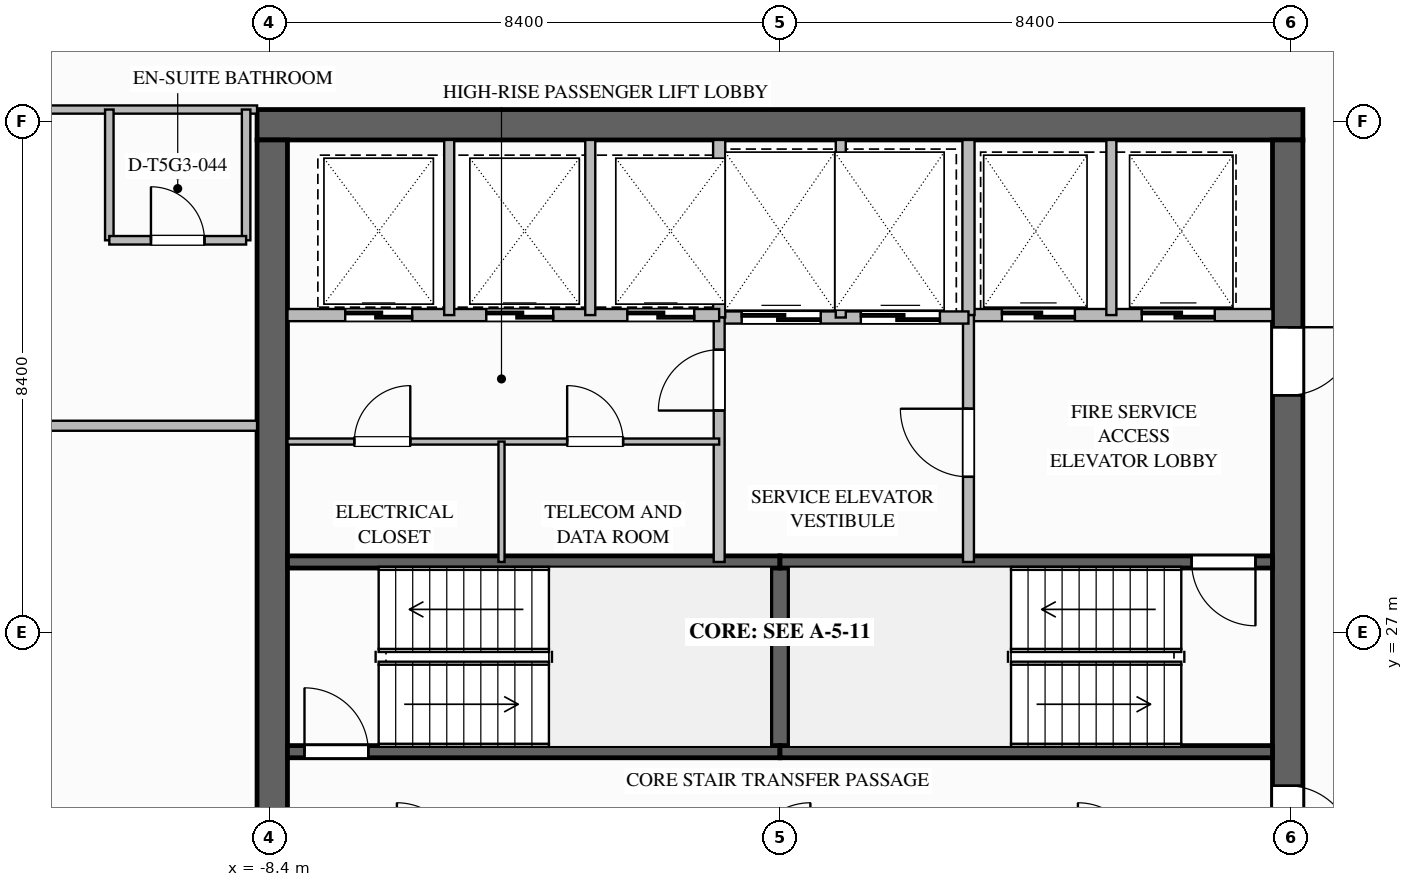
"""IFC4 building model, lengths in metres.
Left out: names, types, materials, properties, quantities, classifications, styles, units other than length and angle.
Written with IfcOpenShell. Run it as: python <this file> out.ifc"""

import sys

from ifc_helpers import new_model, si_unit, direction, frame, frame_2d, origin, place, context, subcontext, project, spatial, rectangle, extrude, element, fill, save


model = new_model("IFC4")
c1 = context("Model", 3, precision=1e-05, world=origin(), true_north=direction((0.0, 1.0)))
c2 = subcontext(c1, "Body", "Model", "MODEL_VIEW")
j1 = project(units=[si_unit("LENGTHUNIT", "METRE"), si_unit("PLANEANGLEUNIT", "RADIAN")], contexts=[c1])
p1 = place(None, origin())
s1 = spatial("IfcSite", under=j1, at=p1, CompositionType="ELEMENT")
p2 = place(p1, origin())
s2 = spatial("IfcBuilding", under=s1, at=p2, CompositionType="ELEMENT")
p3 = place(p2, frame((0.0, 0.0, 286.9)))
s3 = spatial("IfcBuildingStorey", under=s2, at=p3, CompositionType="ELEMENT", Elevation=286.9)
p4 = place(p3, frame((-8.6, 35.35, 0.0), z_axis=(0.0, 0.0, 1.0), x_axis=(1.0, 0.0, 0.0)))
e1 = element("IfcWall", 1, at=p4, inside=s3, PredefinedType="SHEAR", context=c2, shape_type="SweptSolid", body=[
    extrude(rectangle(XDim=17.2, YDim=0.5, at=frame_2d((8.6, 0.0))), origin(), (0.0, 0.0, 1.0), 3.65),
])
p5 = place(p3, frame((8.35, 35.1, 0.0), z_axis=(0.0, 0.0, 1.0), x_axis=(0.0, -1.0, 0.0)))
e2 = element("IfcWall", 2, at=p5, inside=s3, PredefinedType="SHEAR", context=c2, shape_type="SweptSolid", body=[
    extrude(rectangle(XDim=16.2, YDim=0.5, at=frame_2d((8.1, 0.0))), origin(), (0.0, 0.0, 1.0), 3.65),
])
p6 = place(p5, frame((3.08, 0.0, 0.0)))
e3 = element("IfcOpeningElement", 3, at=p6, cuts=e2, PredefinedType="OPENING", context=c2, shape_type="SweptSolid", body=[
    extrude(rectangle(XDim=1.12, YDim=2.1, at=frame_2d((0.56, 1.05))), frame((0.0, 0.26, 0.0), z_axis=(0.0, -1.0, 0.0), x_axis=(1.0, 0.0, 0.0)), (0.0, 0.0, 1.0), 0.52),
])
p7 = place(p5, frame((10.62, 0.0, 0.0)))
e4 = element("IfcOpeningElement", 4, at=p7, cuts=e2, PredefinedType="OPENING", context=c2, shape_type="SweptSolid", body=[
    extrude(rectangle(XDim=1.08, YDim=2.04, at=frame_2d((0.54, 1.02))), frame((0.0, 0.26, 0.0), z_axis=(0.0, -1.0, 0.0), x_axis=(1.0, 0.0, 0.0)), (0.0, 0.0, 1.0), 0.52),
])
p8 = place(p3, frame((-8.35, 18.9, 0.0), z_axis=(0.0, 0.0, 1.0), x_axis=(0.0, 1.0, 0.0)))
e5 = element("IfcWall", 5, at=p8, inside=s3, PredefinedType="SHEAR", context=c2, shape_type="SweptSolid", body=[
    extrude(rectangle(XDim=16.2, YDim=0.5, at=frame_2d((8.1, 0.0))), origin(), (0.0, 0.0, 1.0), 3.65),
])
p9 = place(p3, frame((0.0, 25.04, 0.0), z_axis=(0.0, 0.0, 1.0), x_axis=(0.0, 1.0, 0.0)))
e6 = element("IfcWall", 6, at=p9, inside=s3, PredefinedType="SOLIDWALL", context=c2, shape_type="SweptSolid", body=[
    extrude(rectangle(XDim=3.12, YDim=0.3, at=frame_2d((1.56, 0.0))), origin(), (0.0, 0.0, 1.0), 3.39),
])
p10 = place(p3, frame((-8.1, 25.04, 0.0), z_axis=(0.0, 0.0, 1.0), x_axis=(1.0, 0.0, 0.0)))
e7 = element("IfcWall", 7, at=p10, inside=s3, PredefinedType="SOLIDWALL", context=c2, shape_type="SweptSolid", body=[
    extrude(rectangle(XDim=8.1, YDim=0.2, at=frame_2d((4.05, 0.0))), origin(), (0.0, 0.0, 1.0), 3.39),
])
p11 = place(p10, frame((0.28, 0.0, 0.0)))
e8 = element("IfcOpeningElement", 8, at=p11, cuts=e7, PredefinedType="OPENING", context=c2, shape_type="SweptSolid", body=[
    extrude(rectangle(XDim=1.05, YDim=2.1, at=frame_2d((0.525, 1.05))), frame((0.0, 0.11, 0.0), z_axis=(0.0, -1.0, 0.0), x_axis=(1.0, 0.0, 0.0)), (0.0, 0.0, 1.0), 0.22),
])
for number, where, z_axis, x_axis in (
    (9, (-8.1, 28.16, 0.0), (0.0, 0.0, 1.0), (1.0, 0.0, 0.0)),
    (10, (0.0, 25.04, 0.0), (0.0, 0.0, 1.0), (1.0, 0.0, 0.0)),
):
    element("IfcWall", number, at=place(p3, frame(where, z_axis=z_axis, x_axis=x_axis)), inside=s3, PredefinedType="SOLIDWALL", context=c2, shape_type="SweptSolid", body=[
        extrude(rectangle(XDim=8.1, YDim=0.2, at=frame_2d((4.05, 0.0))), origin(), (0.0, 0.0, 1.0), 3.39),
    ])
p12 = place(p3, frame((8.1, 28.16, 0.0), z_axis=(0.0, 0.0, 1.0), x_axis=(-1.0, 0.0, 0.0)))
e11 = element("IfcWall", 11, at=p12, inside=s3, PredefinedType="SOLIDWALL", context=c2, shape_type="SweptSolid", body=[
    extrude(rectangle(XDim=8.1, YDim=0.2, at=frame_2d((4.05, 0.0))), origin(), (0.0, 0.0, 1.0), 3.39),
])
p13 = place(p12, frame((0.28, 0.0, 0.0)))
e12 = element("IfcOpeningElement", 12, at=p13, cuts=e11, PredefinedType="OPENING", context=c2, shape_type="SweptSolid", body=[
    extrude(rectangle(XDim=1.05, YDim=2.1, at=frame_2d((0.525, 1.05))), frame((0.0, 0.11, 0.0), z_axis=(0.0, -1.0, 0.0), x_axis=(1.0, 0.0, 0.0)), (0.0, 0.0, 1.0), 0.22),
])
p14 = place(p3, frame((3.1, 32.22, 0.0), z_axis=(0.0, 0.0, 1.0), x_axis=(1.0, 0.0, 0.0)))
e13 = element("IfcWall", 13, at=p14, inside=s3, PredefinedType="SOLIDWALL", context=c2, shape_type="SweptSolid", body=[
    extrude(rectangle(XDim=5.0, YDim=0.2, at=frame_2d((2.5, 0.0))), origin(), (0.0, 0.0, 1.0), 3.39),
])
p15 = place(p14, frame((0.55, 0.0, 0.0)))
e14 = element("IfcOpeningElement", 14, at=p15, cuts=e13, PredefinedType="OPENING", context=c2, shape_type="SweptSolid", body=[
    extrude(rectangle(XDim=1.2, YDim=2.2, at=frame_2d((0.6, 1.1))), frame((0.0, 0.11, 0.0), z_axis=(0.0, -1.0, 0.0), x_axis=(1.0, 0.0, 0.0)), (0.0, 0.0, 1.0), 0.22),
])
p16 = place(p14, frame((2.85, 0.0, 0.0)))
e15 = element("IfcOpeningElement", 15, at=p16, cuts=e13, PredefinedType="OPENING", context=c2, shape_type="SweptSolid", body=[
    extrude(rectangle(XDim=1.2, YDim=2.2, at=frame_2d((0.6, 1.1))), frame((0.0, 0.11, 0.0), z_axis=(0.0, -1.0, 0.0), x_axis=(1.0, 0.0, 0.0)), (0.0, 0.0, 1.0), 0.22),
])
p17 = place(p3, frame((3.1, 32.22, 0.0), z_axis=(0.0, 0.0, 1.0), x_axis=(0.0, 1.0, 0.0)))
e16 = element("IfcWall", 16, at=p17, inside=s3, PredefinedType="SOLIDWALL", context=c2, shape_type="SweptSolid", body=[
    extrude(rectangle(XDim=2.88, YDim=0.2, at=frame_2d((1.44, 0.0))), origin(), (0.0, 0.0, 1.0), 3.39),
])
p18 = place(p3, frame((5.45, 32.22, 0.0), z_axis=(0.0, 0.0, 1.0), x_axis=(0.0, 1.0, 0.0)))
e17 = element("IfcWall", 17, at=p18, inside=s3, PredefinedType="PARTITIONING", context=c2, shape_type="SweptSolid", body=[
    extrude(rectangle(XDim=2.88, YDim=0.165, at=frame_2d((1.44, 0.0))), origin(), (0.0, 0.0, 1.0), 3.39),
])
p19 = place(p3, frame((3.1, 28.16, 0.0), z_axis=(0.0, 0.0, 1.0), x_axis=(0.0, 1.0, 0.0)))
e18 = element("IfcWall", 18, at=p19, inside=s3, PredefinedType="SOLIDWALL", context=c2, shape_type="SweptSolid", body=[
    extrude(rectangle(XDim=4.06, YDim=0.18, at=frame_2d((2.03, 0.0))), origin(), (0.0, 0.0, 1.0), 3.39),
])
p20 = place(p19, frame((1.4, 0.0, 0.0)))
e19 = element("IfcOpeningElement", 19, at=p20, cuts=e18, PredefinedType="OPENING", context=c2, shape_type="SweptSolid", body=[
    extrude(rectangle(XDim=1.12, YDim=2.1, at=frame_2d((0.56, 1.05))), frame((0.0, 0.1, 0.0), z_axis=(0.0, -1.0, 0.0), x_axis=(1.0, 0.0, 0.0)), (0.0, 0.0, 1.0), 0.2),
])
p21 = place(p3, frame((-1.0, 32.18, 0.0), z_axis=(0.0, 0.0, 1.0), x_axis=(1.0, 0.0, 0.0)))
e20 = element("IfcWall", 20, at=p21, inside=s3, PredefinedType="SOLIDWALL", context=c2, shape_type="SweptSolid", body=[
    extrude(rectangle(XDim=4.1, YDim=0.2, at=frame_2d((2.05, 0.0))), origin(), (0.0, 0.0, 1.0), 3.39),
])
p22 = place(p21, frame((0.37, 0.0, 0.0)))
e21 = element("IfcOpeningElement", 21, at=p22, cuts=e20, PredefinedType="OPENING", context=c2, shape_type="SweptSolid", body=[
    extrude(rectangle(XDim=1.3, YDim=2.2, at=frame_2d((0.65, 1.1))), frame((0.0, 0.11, 0.0), z_axis=(0.0, -1.0, 0.0), x_axis=(1.0, 0.0, 0.0)), (0.0, 0.0, 1.0), 0.22),
])
p23 = place(p21, frame((2.33, 0.0, 0.0)))
e22 = element("IfcOpeningElement", 22, at=p23, cuts=e20, PredefinedType="OPENING", context=c2, shape_type="SweptSolid", body=[
    extrude(rectangle(XDim=1.3, YDim=2.2, at=frame_2d((0.65, 1.1))), frame((0.0, 0.11, 0.0), z_axis=(0.0, -1.0, 0.0), x_axis=(1.0, 0.0, 0.0)), (0.0, 0.0, 1.0), 0.22),
])
p24 = place(p3, frame((-1.0, 32.18, 0.0), z_axis=(0.0, 0.0, 1.0), x_axis=(0.0, 1.0, 0.0)))
e23 = element("IfcWall", 23, at=p24, inside=s3, PredefinedType="SOLIDWALL", context=c2, shape_type="SweptSolid", body=[
    extrude(rectangle(XDim=2.92, YDim=0.2, at=frame_2d((1.46, 0.0))), origin(), (0.0, 0.0, 1.0), 3.39),
])
p25 = place(p3, frame((1.0, 32.18, 0.0), z_axis=(0.0, 0.0, 1.0), x_axis=(0.0, 1.0, 0.0)))
e24 = element("IfcWall", 24, at=p25, inside=s3, PredefinedType="PARTITIONING", context=c2, shape_type="SweptSolid", body=[
    extrude(rectangle(XDim=2.92, YDim=0.165, at=frame_2d((1.46, 0.0))), origin(), (0.0, 0.0, 1.0), 3.39),
])
p26 = place(p3, frame((-1.0, 28.16, 0.0), z_axis=(0.0, 0.0, 1.0), x_axis=(0.0, 1.0, 0.0)))
e25 = element("IfcWall", 25, at=p26, inside=s3, PredefinedType="SOLIDWALL", context=c2, shape_type="SweptSolid", body=[
    extrude(rectangle(XDim=4.02, YDim=0.18, at=frame_2d((2.01, 0.0))), origin(), (0.0, 0.0, 1.0), 3.39),
])
p27 = place(p26, frame((2.49, 0.0, 0.0)))
e26 = element("IfcOpeningElement", 26, at=p27, cuts=e25, PredefinedType="OPENING", context=c2, shape_type="SweptSolid", body=[
    extrude(rectangle(XDim=1.0, YDim=2.1, at=frame_2d((0.5, 1.05))), frame((0.0, 0.1, 0.0), z_axis=(0.0, -1.0, 0.0), x_axis=(1.0, 0.0, 0.0)), (0.0, 0.0, 1.0), 0.2),
])
p28 = place(p3, frame((-8.1, 32.22, 0.0), z_axis=(0.0, 0.0, 1.0), x_axis=(1.0, 0.0, 0.0)))
e27 = element("IfcWall", 27, at=p28, inside=s3, PredefinedType="SOLIDWALL", context=c2, shape_type="SweptSolid", body=[
    extrude(rectangle(XDim=7.1, YDim=0.2, at=frame_2d((3.55, 0.0))), origin(), (0.0, 0.0, 1.0), 3.39),
])
p29 = place(p28, frame((0.95, 0.0, 0.0)))
e28 = element("IfcOpeningElement", 28, at=p29, cuts=e27, PredefinedType="OPENING", context=c2, shape_type="SweptSolid", body=[
    extrude(rectangle(XDim=1.1, YDim=2.2, at=frame_2d((0.55, 1.1))), frame((0.0, 0.11, 0.0), z_axis=(0.0, -1.0, 0.0), x_axis=(1.0, 0.0, 0.0)), (0.0, 0.0, 1.0), 0.22),
])
p30 = place(p28, frame((3.27, 0.0, 0.0)))
e29 = element("IfcOpeningElement", 29, at=p30, cuts=e27, PredefinedType="OPENING", context=c2, shape_type="SweptSolid", body=[
    extrude(rectangle(XDim=1.1, YDim=2.2, at=frame_2d((0.55, 1.1))), frame((0.0, 0.11, 0.0), z_axis=(0.0, -1.0, 0.0), x_axis=(1.0, 0.0, 0.0)), (0.0, 0.0, 1.0), 0.22),
])
p31 = place(p28, frame((5.59, 0.0, 0.0)))
e30 = element("IfcOpeningElement", 30, at=p31, cuts=e27, PredefinedType="OPENING", context=c2, shape_type="SweptSolid", body=[
    extrude(rectangle(XDim=1.1, YDim=2.2, at=frame_2d((0.55, 1.1))), frame((0.0, 0.11, 0.0), z_axis=(0.0, -1.0, 0.0), x_axis=(1.0, 0.0, 0.0)), (0.0, 0.0, 1.0), 0.22),
])
for number, where, z_axis, x_axis in (
    (31, (-5.44, 32.22, 0.0), (0.0, 0.0, 1.0), (0.0, 1.0, 0.0)),
    (32, (-3.12, 32.22, 0.0), (0.0, 0.0, 1.0), (0.0, 1.0, 0.0)),
):
    element("IfcWall", number, at=place(p3, frame(where, z_axis=z_axis, x_axis=x_axis)), inside=s3, PredefinedType="PARTITIONING", context=c2, shape_type="SweptSolid", body=[
        extrude(rectangle(XDim=2.88, YDim=0.165, at=frame_2d((1.44, 0.0))), origin(), (0.0, 0.0, 1.0), 3.39),
    ])
p32 = place(p3, frame((-8.1, 30.14, 0.0), z_axis=(0.0, 0.0, 1.0), x_axis=(1.0, 0.0, 0.0)))
e33 = element("IfcWall", 33, at=p32, inside=s3, PredefinedType="PARTITIONING", context=c2, shape_type="SweptSolid", body=[
    extrude(rectangle(XDim=7.1, YDim=0.1, at=frame_2d((3.55, 0.0))), origin(), (0.0, 0.0, 1.0), 3.39),
])
p33 = place(p32, frame((1.1, 0.0, 0.0)))
e34 = element("IfcOpeningElement", 34, at=p33, cuts=e33, PredefinedType="OPENING", context=c2, shape_type="SweptSolid", body=[
    extrude(rectangle(XDim=0.92, YDim=2.1, at=frame_2d((0.46, 1.05))), frame((0.0, 0.06, 0.0), z_axis=(0.0, -1.0, 0.0), x_axis=(1.0, 0.0, 0.0)), (0.0, 0.0, 1.0), 0.12),
])
p34 = place(p32, frame((4.6, 0.0, 0.0)))
e35 = element("IfcOpeningElement", 35, at=p34, cuts=e33, PredefinedType="OPENING", context=c2, shape_type="SweptSolid", body=[
    extrude(rectangle(XDim=0.92, YDim=2.1, at=frame_2d((0.46, 1.05))), frame((0.0, 0.06, 0.0), z_axis=(0.0, -1.0, 0.0), x_axis=(1.0, 0.0, 0.0)), (0.0, 0.0, 1.0), 0.12),
])
p35 = place(p3, frame((-4.58, 28.16, 0.0), z_axis=(0.0, 0.0, 1.0), x_axis=(0.0, 1.0, 0.0)))
e36 = element("IfcWall", 36, at=p35, inside=s3, PredefinedType="PARTITIONING", context=c2, shape_type="SweptSolid", body=[
    extrude(rectangle(XDim=1.98, YDim=0.1, at=frame_2d((0.99, 0.0))), origin(), (0.0, 0.0, 1.0), 3.39),
])
p36 = place(p3, frame((-16.2, 35.6, 0.0), z_axis=(0.0, 0.0, 1.0), x_axis=(1.0, 0.0, 0.0)))
e37 = element("IfcWall", 37, at=p36, inside=s3, PredefinedType="PARTITIONING", context=c2, shape_type="SweptSolid", body=[
    extrude(rectangle(XDim=7.6, YDim=0.135, at=frame_2d((3.8, 0.0))), origin(), (0.0, 0.0, 1.0), 2.768),
])
p37 = place(p36, frame((2.155, 0.0, 0.0)))
e38 = element("IfcOpeningElement", 38, at=p37, cuts=e37, PredefinedType="OPENING", context=c2, shape_type="SweptSolid", body=[
    extrude(rectangle(XDim=1.26, YDim=2.2, at=frame_2d((0.63, 1.1))), frame((0.0, 0.077, 0.0), z_axis=(0.0, -1.0, 0.0), x_axis=(1.0, 0.0, 0.0)), (0.0, 0.0, 1.0), 0.155),
])
p38 = place(p3, frame((-21.4, 30.4, 0.0), z_axis=(0.0, 0.0, 1.0), x_axis=(1.0, 0.0, 0.0)))
e39 = element("IfcWall", 39, at=p38, inside=s3, PredefinedType="PARTITIONING", context=c2, shape_type="SweptSolid", body=[
    extrude(rectangle(XDim=12.8, YDim=0.165, at=frame_2d((6.4, 0.0))), origin(), (0.0, 0.0, 1.0), 3.39),
])
for number, where, z_axis, x_axis in (
    (40, (-11.03, 35.6, 0.0), (0.0, 0.0, 1.0), (0.0, -1.0, 0.0)),
    (41, (-8.78, 35.6, 0.0), (0.0, 0.0, 1.0), (0.0, -1.0, 0.0)),
):
    element("IfcWall", number, at=place(p3, frame(where, z_axis=z_axis, x_axis=x_axis)), inside=s3, PredefinedType="PLUMBINGWALL", context=c2, shape_type="SweptSolid", body=[
        extrude(rectangle(XDim=2.15, YDim=0.14, at=frame_2d((1.075, 0.0))), origin(), (0.0, 0.0, 1.0), 3.39),
    ])
p39 = place(p3, frame((-11.03, 33.45, 0.0), z_axis=(0.0, 0.0, 1.0), x_axis=(1.0, 0.0, 0.0)))
e42 = element("IfcWall", 42, at=p39, inside=s3, PredefinedType="PLUMBINGWALL", context=c2, shape_type="SweptSolid", body=[
    extrude(rectangle(XDim=2.25, YDim=0.14, at=frame_2d((1.125, 0.0))), origin(), (0.0, 0.0, 1.0), 3.39),
])
p40 = place(p39, frame((0.685, 0.0, 0.0)))
e43 = element("IfcOpeningElement", 43, at=p40, cuts=e42, PredefinedType="OPENING", context=c2, shape_type="SweptSolid", body=[
    extrude(rectangle(XDim=0.88, YDim=2.1, at=frame_2d((0.44, 1.05))), frame((0.0, 0.08, 0.0), z_axis=(0.0, -1.0, 0.0), x_axis=(1.0, 0.0, 0.0)), (0.0, 0.0, 1.0), 0.16),
])
p41 = place(p11, origin())
e44 = element("IfcDoor", 44, at=p41, inside=s3, OperationType="SINGLE_SWING_LEFT", PredefinedType="DOOR", context=c2, shape_type="SweptSolid", body=[
    extrude(rectangle(XDim=1.05, YDim=2.1, at=frame_2d((0.525, 1.05))), frame((0.0, 0.025, 0.0), z_axis=(0.0, -1.0, 0.0), x_axis=(1.0, 0.0, 0.0)), (0.0, 0.0, 1.0), 0.05),
])
fill(e8, e44)
p42 = place(p13, origin())
e45 = element("IfcDoor", 45, at=p42, inside=s3, OperationType="SINGLE_SWING_LEFT", PredefinedType="DOOR", context=c2, shape_type="SweptSolid", body=[
    extrude(rectangle(XDim=1.05, YDim=2.1, at=frame_2d((0.525, 1.05))), frame((0.0, 0.025, 0.0), z_axis=(0.0, -1.0, 0.0), x_axis=(1.0, 0.0, 0.0)), (0.0, 0.0, 1.0), 0.05),
])
fill(e12, e45)
p43 = place(p15, origin())
e46 = element("IfcDoor", 46, at=p43, inside=s3, OperationType="SLIDING_TO_LEFT", PredefinedType="DOOR", context=c2, shape_type="SweptSolid", body=[
    extrude(rectangle(XDim=1.2, YDim=2.2, at=frame_2d((0.6, 1.1))), frame((0.0, 0.025, 0.0), z_axis=(0.0, -1.0, 0.0), x_axis=(1.0, 0.0, 0.0)), (0.0, 0.0, 1.0), 0.05),
])
fill(e14, e46)
p44 = place(p16, origin())
e47 = element("IfcDoor", 47, at=p44, inside=s3, OperationType="SLIDING_TO_LEFT", PredefinedType="DOOR", context=c2, shape_type="SweptSolid", body=[
    extrude(rectangle(XDim=1.2, YDim=2.2, at=frame_2d((0.6, 1.1))), frame((0.0, 0.025, 0.0), z_axis=(0.0, -1.0, 0.0), x_axis=(1.0, 0.0, 0.0)), (0.0, 0.0, 1.0), 0.05),
])
fill(e15, e47)
p45 = place(p20, origin())
e48 = element("IfcDoor", 48, at=p45, inside=s3, OperationType="SINGLE_SWING_RIGHT", PredefinedType="DOOR", context=c2, shape_type="SweptSolid", body=[
    extrude(rectangle(XDim=1.12, YDim=2.1, at=frame_2d((0.56, 1.05))), frame((0.0, 0.025, 0.0), z_axis=(0.0, -1.0, 0.0), x_axis=(1.0, 0.0, 0.0)), (0.0, 0.0, 1.0), 0.05),
])
fill(e19, e48)
p46 = place(p6, origin())
e49 = element("IfcDoor", 49, at=p46, inside=s3, OperationType="SINGLE_SWING_LEFT", PredefinedType="DOOR", context=c2, shape_type="SweptSolid", body=[
    extrude(rectangle(XDim=1.12, YDim=2.1, at=frame_2d((0.56, 1.05))), frame((0.0, 0.025, 0.0), z_axis=(0.0, -1.0, 0.0), x_axis=(1.0, 0.0, 0.0)), (0.0, 0.0, 1.0), 0.05),
])
fill(e3, e49)
p47 = place(p22, origin())
e50 = element("IfcDoor", 50, at=p47, inside=s3, OperationType="SLIDING_TO_LEFT", PredefinedType="DOOR", context=c2, shape_type="SweptSolid", body=[
    extrude(rectangle(XDim=1.3, YDim=2.2, at=frame_2d((0.65, 1.1))), frame((0.0, 0.025, 0.0), z_axis=(0.0, -1.0, 0.0), x_axis=(1.0, 0.0, 0.0)), (0.0, 0.0, 1.0), 0.05),
])
fill(e21, e50)
p48 = place(p23, origin())
e51 = element("IfcDoor", 51, at=p48, inside=s3, OperationType="SLIDING_TO_LEFT", PredefinedType="DOOR", context=c2, shape_type="SweptSolid", body=[
    extrude(rectangle(XDim=1.3, YDim=2.2, at=frame_2d((0.65, 1.1))), frame((0.0, 0.025, 0.0), z_axis=(0.0, -1.0, 0.0), x_axis=(1.0, 0.0, 0.0)), (0.0, 0.0, 1.0), 0.05),
])
fill(e22, e51)
p49 = place(p27, origin())
e52 = element("IfcDoor", 52, at=p49, inside=s3, OperationType="SINGLE_SWING_LEFT", PredefinedType="DOOR", context=c2, shape_type="SweptSolid", body=[
    extrude(rectangle(XDim=1.0, YDim=2.1, at=frame_2d((0.5, 1.05))), frame((0.0, 0.025, 0.0), z_axis=(0.0, -1.0, 0.0), x_axis=(1.0, 0.0, 0.0)), (0.0, 0.0, 1.0), 0.05),
])
fill(e26, e52)
p50 = place(p29, origin())
e53 = element("IfcDoor", 53, at=p50, inside=s3, OperationType="SLIDING_TO_LEFT", PredefinedType="DOOR", context=c2, shape_type="SweptSolid", body=[
    extrude(rectangle(XDim=1.1, YDim=2.2, at=frame_2d((0.55, 1.1))), frame((0.0, 0.025, 0.0), z_axis=(0.0, -1.0, 0.0), x_axis=(1.0, 0.0, 0.0)), (0.0, 0.0, 1.0), 0.05),
])
fill(e28, e53)
p51 = place(p30, origin())
e54 = element("IfcDoor", 54, at=p51, inside=s3, OperationType="SLIDING_TO_LEFT", PredefinedType="DOOR", context=c2, shape_type="SweptSolid", body=[
    extrude(rectangle(XDim=1.1, YDim=2.2, at=frame_2d((0.55, 1.1))), frame((0.0, 0.025, 0.0), z_axis=(0.0, -1.0, 0.0), x_axis=(1.0, 0.0, 0.0)), (0.0, 0.0, 1.0), 0.05),
])
fill(e29, e54)
p52 = place(p31, origin())
e55 = element("IfcDoor", 55, at=p52, inside=s3, OperationType="SLIDING_TO_LEFT", PredefinedType="DOOR", context=c2, shape_type="SweptSolid", body=[
    extrude(rectangle(XDim=1.1, YDim=2.2, at=frame_2d((0.55, 1.1))), frame((0.0, 0.025, 0.0), z_axis=(0.0, -1.0, 0.0), x_axis=(1.0, 0.0, 0.0)), (0.0, 0.0, 1.0), 0.05),
])
fill(e30, e55)
p53 = place(p33, origin())
e56 = element("IfcDoor", 56, at=p53, inside=s3, OperationType="SINGLE_SWING_RIGHT", PredefinedType="DOOR", context=c2, shape_type="SweptSolid", body=[
    extrude(rectangle(XDim=0.92, YDim=2.1, at=frame_2d((0.46, 1.05))), frame((0.0, 0.025, 0.0), z_axis=(0.0, -1.0, 0.0), x_axis=(1.0, 0.0, 0.0)), (0.0, 0.0, 1.0), 0.05),
])
fill(e34, e56)
p54 = place(p34, origin())
e57 = element("IfcDoor", 57, at=p54, inside=s3, OperationType="SINGLE_SWING_LEFT", PredefinedType="DOOR", context=c2, shape_type="SweptSolid", body=[
    extrude(rectangle(XDim=0.92, YDim=2.1, at=frame_2d((0.46, 1.05))), frame((0.0, 0.025, 0.0), z_axis=(0.0, -1.0, 0.0), x_axis=(1.0, 0.0, 0.0)), (0.0, 0.0, 1.0), 0.05),
])
fill(e35, e57)
p55 = place(p7, origin())
e58 = element("IfcDoor", 58, at=p55, inside=s3, OperationType="SINGLE_SWING_RIGHT", PredefinedType="DOOR", context=c2, shape_type="SweptSolid", body=[
    extrude(rectangle(XDim=1.08, YDim=2.04, at=frame_2d((0.54, 1.02))), frame((0.0, 0.025, 0.0), z_axis=(0.0, -1.0, 0.0), x_axis=(1.0, 0.0, 0.0)), (0.0, 0.0, 1.0), 0.05),
])
fill(e4, e58)
p56 = place(p40, origin())
e59 = element("IfcDoor", 59, at=p56, inside=s3, OperationType="SINGLE_SWING_LEFT", PredefinedType="DOOR", context=c2, shape_type="SweptSolid", body=[
    extrude(rectangle(XDim=0.88, YDim=2.1, at=frame_2d((0.44, 1.05))), frame((0.0, 0.025, 0.0), z_axis=(0.0, -1.0, 0.0), x_axis=(1.0, 0.0, 0.0)), (0.0, 0.0, 1.0), 0.05),
])
fill(e43, e59)
save(model, sys.argv[1])
